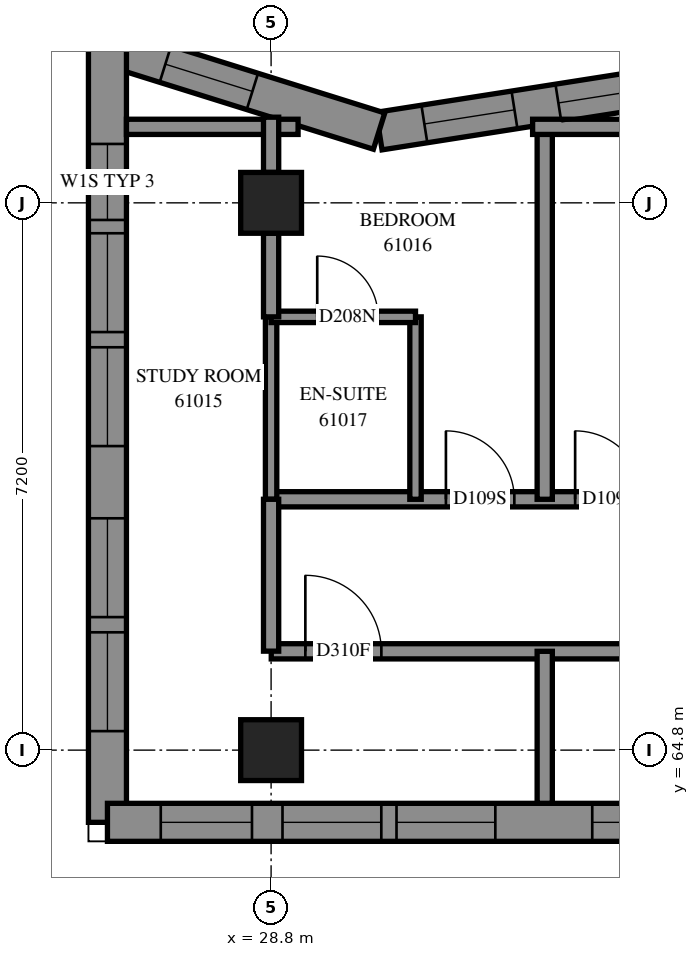
"""IFC4 building model, lengths in metres.
Left out: names, types, materials, properties, quantities, classifications, styles, units other than length and angle.
Written with IfcOpenShell. Run it as: python <this file> out.ifc"""

import sys

from ifc_helpers import new_model, si_unit, direction, frame, frame_2d, origin, origin_2d, place, context, subcontext, project, spatial, polyline, rectangle, outline, extrude, element, fill, save


model = new_model("IFC4")
c1 = context("Model", 3, precision=1e-05, world=origin(), true_north=direction((0.0, 1.0)))
c2 = subcontext(c1, "Body", "Model", "MODEL_VIEW")
j1 = project(units=[si_unit("LENGTHUNIT", "METRE"), si_unit("PLANEANGLEUNIT", "RADIAN")], contexts=[c1])
p1 = place(None, origin())
s1 = spatial("IfcSite", under=j1, at=p1, CompositionType="ELEMENT")
p2 = place(p1, origin())
s2 = spatial("IfcBuilding", under=s1, at=p2, CompositionType="ELEMENT")
p3 = place(p2, frame((0.0, 0.0, 223.6)))
s3 = spatial("IfcBuildingStorey", under=s2, at=p3, CompositionType="ELEMENT", Elevation=223.6)
for number, where, z_axis, x_axis in (
    (1, (28.8, 64.8, 0.0), (0.0, 0.0, 1.0), (1.0, 0.0, 0.0)),
    (2, (28.8, 72.0, 0.0), (0.0, 0.0, 1.0), (1.0, 0.0, 0.0)),
):
    element("IfcColumn", number, at=place(p3, frame(where, z_axis=z_axis, x_axis=x_axis)), inside=s3, PredefinedType="COLUMN", context=c2, shape_type="SweptSolid", body=[
        extrude(rectangle(XDim=0.8, YDim=0.8, at=origin_2d()), origin(), (0.0, 0.0, 1.0), 3.1),
    ])
p4 = place(p3, frame((34.083, 73.55, 0.0), z_axis=(0.0, 0.0, 1.0), x_axis=(-0.9879139197, -0.1550035072, 0.0)))
e3 = element("IfcWall", 3, at=p4, inside=s3, PredefinedType="SOLIDWALL", context=c2, shape_type="SweptSolid", body=[
    extrude(outline(polyline([(-0.039, -0.25), (3.85, -0.25), (3.967, 0.25), (0.039, 0.25), (-0.039, -0.25)])), origin(), (0.0, 0.0, 1.0), 3.1),
])
p5 = place(p4, frame((0.321, 0.0, 0.45)))
e4 = element("IfcOpeningElement", 4, at=p5, cuts=e3, PredefinedType="OPENING", context=c2, shape_type="SweptSolid", body=[
    extrude(rectangle(XDim=1.2, YDim=2.5, at=frame_2d((0.6, 1.25))), frame((0.0, 0.26, 0.0), z_axis=(0.0, -1.0, 0.0), x_axis=(1.0, 0.0, 0.0)), (0.0, 0.0, 1.0), 0.52),
])
p6 = place(p4, frame((2.106, 0.0, 0.45)))
e5 = element("IfcOpeningElement", 5, at=p6, cuts=e3, PredefinedType="OPENING", context=c2, shape_type="SweptSolid", body=[
    extrude(rectangle(XDim=1.2, YDim=2.5, at=frame_2d((0.6, 1.25))), frame((0.0, 0.26, 0.0), z_axis=(0.0, -1.0, 0.0), x_axis=(1.0, 0.0, 0.0)), (0.0, 0.0, 1.0), 0.52),
])
p7 = place(p3, frame((30.221, 72.944, 0.0), z_axis=(0.0, 0.0, 1.0), x_axis=(-0.9543287576, 0.2987584683, 0.0)))
e6 = element("IfcWall", 6, at=p7, inside=s3, PredefinedType="SOLIDWALL", context=c2, shape_type="SweptSolid", body=[
    extrude(outline(polyline([(0.058, -0.25), (4.085, -0.25), (3.405, 0.25), (-0.058, 0.25), (0.058, -0.25)])), origin(), (0.0, 0.0, 1.0), 3.1),
])
p8 = place(p7, frame((1.747, 0.0, 0.45)))
e7 = element("IfcOpeningElement", 7, at=p8, cuts=e6, PredefinedType="OPENING", context=c2, shape_type="SweptSolid", body=[
    extrude(rectangle(XDim=1.2, YDim=2.5, at=frame_2d((0.6, 1.25))), frame((0.0, 0.26, 0.0), z_axis=(0.0, -1.0, 0.0), x_axis=(1.0, 0.0, 0.0)), (0.0, 0.0, 1.0), 0.52),
])
p9 = place(p3, frame((26.647, 74.063, 0.0), z_axis=(0.0, 0.0, 1.0), x_axis=(0.0, -1.0, 0.0)))
e8 = element("IfcWall", 8, at=p9, inside=s3, PredefinedType="SOLIDWALL", context=c2, shape_type="SweptSolid", body=[
    extrude(outline(polyline([(-0.34, -0.25), (10.463, -0.25), (9.963, 0.25), (0.34, 0.25), (-0.34, -0.25)])), origin(), (0.0, 0.0, 1.0), 3.1),
])
p10 = place(p9, frame((2.463, 0.0, 0.45)))
e9 = element("IfcOpeningElement", 9, at=p10, cuts=e8, PredefinedType="OPENING", context=c2, shape_type="SweptSolid", body=[
    extrude(rectangle(XDim=1.3, YDim=2.5, at=frame_2d((0.65, 1.25))), frame((0.0, 0.26, 0.0), z_axis=(0.0, -1.0, 0.0), x_axis=(1.0, 0.0, 0.0)), (0.0, 0.0, 1.0), 0.52),
])
p11 = place(p9, frame((3.963, 0.0, 0.45)))
e10 = element("IfcOpeningElement", 10, at=p11, cuts=e8, PredefinedType="OPENING", context=c2, shape_type="SweptSolid", body=[
    extrude(rectangle(XDim=1.3, YDim=2.5, at=frame_2d((0.65, 1.25))), frame((0.0, 0.26, 0.0), z_axis=(0.0, -1.0, 0.0), x_axis=(1.0, 0.0, 0.0)), (0.0, 0.0, 1.0), 0.52),
])
p12 = place(p9, frame((6.213, 0.0, 0.45)))
e11 = element("IfcOpeningElement", 11, at=p12, cuts=e8, PredefinedType="OPENING", context=c2, shape_type="SweptSolid", body=[
    extrude(rectangle(XDim=1.3, YDim=2.5, at=frame_2d((0.65, 1.25))), frame((0.0, 0.26, 0.0), z_axis=(0.0, -1.0, 0.0), x_axis=(1.0, 0.0, 0.0)), (0.0, 0.0, 1.0), 0.52),
])
p13 = place(p9, frame((7.713, 0.0, 0.45)))
e12 = element("IfcOpeningElement", 12, at=p13, cuts=e8, PredefinedType="OPENING", context=c2, shape_type="SweptSolid", body=[
    extrude(rectangle(XDim=1.3, YDim=2.5, at=frame_2d((0.65, 1.25))), frame((0.0, 0.26, 0.0), z_axis=(0.0, -1.0, 0.0), x_axis=(1.0, 0.0, 0.0)), (0.0, 0.0, 1.0), 0.52),
])
p14 = place(p9, frame((1.288, 0.0, 0.45)))
e13 = element("IfcOpeningElement", 13, at=p14, cuts=e8, PredefinedType="OPENING", context=c2, shape_type="SweptSolid", body=[
    extrude(rectangle(XDim=1.0, YDim=2.5, at=frame_2d((0.5, 1.25))), frame((0.0, 0.26, 0.0), z_axis=(0.0, -1.0, 0.0), x_axis=(1.0, 0.0, 0.0)), (0.0, 0.0, 1.0), 0.52),
])
p15 = place(p3, frame((26.647, 63.85, 0.0), z_axis=(0.0, 0.0, 1.0), x_axis=(1.0, 0.0, 0.0)))
e14 = element("IfcWall", 14, at=p15, inside=s3, PredefinedType="SOLIDWALL", context=c2, shape_type="SweptSolid", body=[
    extrude(outline(polyline([(-0.25, -0.25), (8.153, -0.25), (8.653, 0.25), (0.25, 0.25), (-0.25, -0.25)])), origin(), (0.0, 0.0, 1.0), 3.1),
])
p16 = place(p15, frame((2.303, 0.0, 0.45)))
e15 = element("IfcOpeningElement", 15, at=p16, cuts=e14, PredefinedType="OPENING", context=c2, shape_type="SweptSolid", body=[
    extrude(rectangle(XDim=1.3, YDim=2.5, at=frame_2d((0.65, 1.25))), frame((0.0, 0.26, 0.0), z_axis=(0.0, -1.0, 0.0), x_axis=(1.0, 0.0, 0.0)), (0.0, 0.0, 1.0), 0.52),
])
p17 = place(p15, frame((3.803, 0.0, 0.45)))
e16 = element("IfcOpeningElement", 16, at=p17, cuts=e14, PredefinedType="OPENING", context=c2, shape_type="SweptSolid", body=[
    extrude(rectangle(XDim=1.3, YDim=2.5, at=frame_2d((0.65, 1.25))), frame((0.0, 0.26, 0.0), z_axis=(0.0, -1.0, 0.0), x_axis=(1.0, 0.0, 0.0)), (0.0, 0.0, 1.0), 0.52),
])
p18 = place(p15, frame((0.702, 0.0, 0.45)))
e17 = element("IfcOpeningElement", 17, at=p18, cuts=e14, PredefinedType="OPENING", context=c2, shape_type="SweptSolid", body=[
    extrude(rectangle(XDim=1.2, YDim=2.5, at=frame_2d((0.6, 1.25))), frame((0.0, 0.26, 0.0), z_axis=(0.0, -1.0, 0.0), x_axis=(1.0, 0.0, 0.0)), (0.0, 0.0, 1.0), 0.52),
])
p19 = place(p15, frame((6.378, 0.0, 0.45)))
e18 = element("IfcOpeningElement", 18, at=p19, cuts=e14, PredefinedType="OPENING", context=c2, shape_type="SweptSolid", body=[
    extrude(rectangle(XDim=1.2, YDim=2.5, at=frame_2d((0.6, 1.25))), frame((0.0, 0.26, 0.0), z_axis=(0.0, -1.0, 0.0), x_axis=(1.0, 0.0, 0.0)), (0.0, 0.0, 1.0), 0.52),
])
p20 = place(p3, frame((28.8, 68.1, 0.0), z_axis=(0.0, 0.0, 1.0), x_axis=(1.0, 0.0, 0.0)))
e19 = element("IfcWall", 19, at=p20, inside=s3, PredefinedType="PARTITIONING", context=c2, shape_type="SweptSolid", body=[
    extrude(rectangle(XDim=11.8, YDim=0.2, at=frame_2d((5.9, 0.0))), origin(), (0.0, 0.0, 1.0), 3.1),
])
p21 = place(p20, frame((2.3, 0.0, 0.0)))
e20 = element("IfcOpeningElement", 20, at=p21, cuts=e19, PredefinedType="OPENING", context=c2, shape_type="SweptSolid", body=[
    extrude(rectangle(XDim=0.9, YDim=2.1, at=frame_2d((0.45, 1.05))), frame((0.0, 0.11, 0.0), z_axis=(0.0, -1.0, 0.0), x_axis=(1.0, 0.0, 0.0)), (0.0, 0.0, 1.0), 0.22),
])
p22 = place(p20, frame((4.0, 0.0, 0.0)))
e21 = element("IfcOpeningElement", 21, at=p22, cuts=e19, PredefinedType="OPENING", context=c2, shape_type="SweptSolid", body=[
    extrude(rectangle(XDim=0.9, YDim=2.1, at=frame_2d((0.45, 1.05))), frame((0.0, 0.11, 0.0), z_axis=(0.0, -1.0, 0.0), x_axis=(1.0, 0.0, 0.0)), (0.0, 0.0, 1.0), 0.22),
])
p23 = place(p20, frame((9.5, 0.0, 0.0)))
e22 = element("IfcOpeningElement", 22, at=p23, cuts=e19, PredefinedType="OPENING", context=c2, shape_type="SweptSolid", body=[
    extrude(rectangle(XDim=0.9, YDim=2.1, at=frame_2d((0.45, 1.05))), frame((0.0, 0.11, 0.0), z_axis=(0.0, -1.0, 0.0), x_axis=(1.0, 0.0, 0.0)), (0.0, 0.0, 1.0), 0.22),
])
p24 = place(p3, frame((28.802, 66.1, 0.0), z_axis=(0.0, 0.0, 1.0), x_axis=(1.0, 0.0, 0.0)))
e23 = element("IfcWall", 23, at=p24, inside=s3, PredefinedType="PARTITIONING", context=c2, shape_type="SweptSolid", body=[
    extrude(rectangle(XDim=9.798, YDim=0.2, at=frame_2d((4.899, 0.0))), origin(), (0.0, 0.0, 1.0), 3.1),
])
p25 = place(p24, frame((0.449, 0.0, 0.0)))
e24 = element("IfcOpeningElement", 24, at=p25, cuts=e23, PredefinedType="OPENING", context=c2, shape_type="SweptSolid", body=[
    extrude(rectangle(XDim=1.0, YDim=2.1, at=frame_2d((0.5, 1.05))), frame((0.0, 0.11, 0.0), z_axis=(0.0, -1.0, 0.0), x_axis=(1.0, 0.0, 0.0)), (0.0, 0.0, 1.0), 0.22),
])
p26 = place(p24, frame((5.459, 0.0, 0.0)))
e25 = element("IfcOpeningElement", 25, at=p26, cuts=e23, PredefinedType="OPENING", context=c2, shape_type="SweptSolid", body=[
    extrude(rectangle(XDim=1.0, YDim=2.1, at=frame_2d((0.5, 1.05))), frame((0.0, 0.11, 0.0), z_axis=(0.0, -1.0, 0.0), x_axis=(1.0, 0.0, 0.0)), (0.0, 0.0, 1.0), 0.22),
])
p27 = place(p3, frame((32.4, 68.1, 0.0), z_axis=(0.0, 0.0, 1.0), x_axis=(0.0, 1.0, 0.0)))
e26 = element("IfcWall", 26, at=p27, inside=s3, PredefinedType="PARTITIONING", context=c2, shape_type="SweptSolid", body=[
    extrude(rectangle(XDim=4.933, YDim=0.2, at=frame_2d((2.466, 0.0))), origin(), (0.0, 0.0, 1.0), 3.1),
])
p28 = place(p3, frame((32.24, 73.0, 0.0), z_axis=(0.0, 0.0, 1.0), x_axis=(1.0, 0.0, 0.0)))
e27 = element("IfcWall", 27, at=p28, inside=s3, PredefinedType="PARTITIONING", context=c2, shape_type="SweptSolid", body=[
    extrude(rectangle(XDim=3.684, YDim=0.2, at=frame_2d((1.842, 0.0))), origin(), (0.0, 0.0, 1.0), 3.1),
])
p29 = place(p3, frame((28.8, 68.1, 0.0), z_axis=(0.0, 0.0, 1.0), x_axis=(0.0, 1.0, 0.0)))
e28 = element("IfcWall", 28, at=p29, inside=s3, PredefinedType="PARTITIONING", context=c2, shape_type="SweptSolid", body=[
    extrude(rectangle(XDim=2.4, YDim=0.15, at=frame_2d((1.2, 0.0))), origin(), (0.0, 0.0, 1.0), 2.6),
])
p30 = place(p3, frame((30.7, 68.1, 0.0), z_axis=(0.0, 0.0, 1.0), x_axis=(0.0, 1.0, 0.0)))
e29 = element("IfcWall", 29, at=p30, inside=s3, PredefinedType="PARTITIONING", context=c2, shape_type="SweptSolid", body=[
    extrude(rectangle(XDim=2.4, YDim=0.15, at=frame_2d((1.2, 0.0))), origin(), (0.0, 0.0, 1.0), 3.1),
])
p31 = place(p3, frame((26.897, 73.0, 0.0), z_axis=(0.0, 0.0, 1.0), x_axis=(1.0, 0.0, 0.0)))
e30 = element("IfcWall", 30, at=p31, inside=s3, PredefinedType="PARTITIONING", context=c2, shape_type="SweptSolid", body=[
    extrude(rectangle(XDim=2.258, YDim=0.2, at=frame_2d((1.129, 0.0))), origin(), (0.0, 0.0, 1.0), 3.1),
])
p32 = place(p3, frame((28.8, 66.102, 0.0), z_axis=(0.0, 0.0, 1.0), x_axis=(0.0, 1.0, 0.0)))
e31 = element("IfcWall", 31, at=p32, inside=s3, PredefinedType="PARTITIONING", context=c2, shape_type="SweptSolid", body=[
    extrude(rectangle(XDim=1.998, YDim=0.2, at=frame_2d((0.999, 0.0))), origin(), (0.0, 0.0, 1.0), 2.6),
])
p33 = place(p3, frame((32.4, 64.1, 0.0), z_axis=(0.0, 0.0, 1.0), x_axis=(0.0, 1.0, 0.0)))
e32 = element("IfcWall", 32, at=p33, inside=s3, PredefinedType="PARTITIONING", context=c2, shape_type="SweptSolid", body=[
    extrude(rectangle(XDim=2.0, YDim=0.2, at=frame_2d((1.0, 0.0))), origin(), (0.0, 0.0, 1.0), 3.1),
])
p34 = place(p3, frame((28.8, 70.5, 0.0), z_axis=(0.0, 0.0, 1.0), x_axis=(1.0, 0.0, 0.0)))
e33 = element("IfcWall", 33, at=p34, inside=s3, PredefinedType="PARTITIONING", context=c2, shape_type="SweptSolid", body=[
    extrude(rectangle(XDim=1.9, YDim=0.15, at=frame_2d((0.95, 0.0))), origin(), (0.0, 0.0, 1.0), 3.1),
])
p35 = place(p34, frame((0.607, 0.0, 0.0)))
e34 = element("IfcOpeningElement", 34, at=p35, cuts=e33, PredefinedType="OPENING", context=c2, shape_type="SweptSolid", body=[
    extrude(rectangle(XDim=0.8, YDim=2.1, at=frame_2d((0.4, 1.05))), frame((0.0, 0.085, 0.0), z_axis=(0.0, -1.0, 0.0), x_axis=(1.0, 0.0, 0.0)), (0.0, 0.0, 1.0), 0.17),
])
p36 = place(p3, frame((28.8, 70.5, 0.0), z_axis=(0.0, 0.0, 1.0), x_axis=(0.0, 1.0, 0.0)))
e35 = element("IfcWall", 35, at=p36, inside=s3, PredefinedType="PARTITIONING", context=c2, shape_type="SweptSolid", body=[
    extrude(rectangle(XDim=1.1, YDim=0.2, at=frame_2d((0.55, 0.0))), origin(), (0.0, 0.0, 1.0), 2.6),
])
p37 = place(p3, frame((28.8, 72.4, 0.0), z_axis=(0.0, 0.0, 1.0), x_axis=(0.0, 1.0, 0.0)))
e36 = element("IfcWall", 36, at=p37, inside=s3, PredefinedType="PARTITIONING", context=c2, shape_type="SweptSolid", body=[
    extrude(rectangle(XDim=0.727, YDim=0.2, at=frame_2d((0.363, 0.0))), origin(), (0.0, 0.0, 1.0), 3.1),
])
p38 = place(p5, origin())
e37 = element("IfcWindow", 37, at=p38, inside=s3, PartitioningType="SINGLE_PANEL", PredefinedType="WINDOW", context=c2, shape_type="SweptSolid", body=[
    extrude(rectangle(XDim=1.2, YDim=2.5, at=frame_2d((0.6, 1.25))), frame((0.0, 0.18, 0.0), z_axis=(0.0, -1.0, 0.0), x_axis=(1.0, 0.0, 0.0)), (0.0, 0.0, 1.0), 0.06),
])
fill(e4, e37)
p39 = place(p6, origin())
e38 = element("IfcWindow", 38, at=p39, inside=s3, PartitioningType="SINGLE_PANEL", PredefinedType="WINDOW", context=c2, shape_type="SweptSolid", body=[
    extrude(rectangle(XDim=1.2, YDim=2.5, at=frame_2d((0.6, 1.25))), frame((0.0, 0.18, 0.0), z_axis=(0.0, -1.0, 0.0), x_axis=(1.0, 0.0, 0.0)), (0.0, 0.0, 1.0), 0.06),
])
fill(e5, e38)
p40 = place(p8, origin())
e39 = element("IfcWindow", 39, at=p40, inside=s3, PartitioningType="SINGLE_PANEL", PredefinedType="WINDOW", context=c2, shape_type="SweptSolid", body=[
    extrude(rectangle(XDim=1.2, YDim=2.5, at=frame_2d((0.6, 1.25))), frame((0.0, 0.18, 0.0), z_axis=(0.0, -1.0, 0.0), x_axis=(1.0, 0.0, 0.0)), (0.0, 0.0, 1.0), 0.06),
])
fill(e7, e39)
p41 = place(p10, origin())
e40 = element("IfcWindow", 40, at=p41, inside=s3, PartitioningType="SINGLE_PANEL", PredefinedType="WINDOW", context=c2, shape_type="SweptSolid", body=[
    extrude(rectangle(XDim=1.3, YDim=2.5, at=frame_2d((0.65, 1.25))), frame((0.0, 0.18, 0.0), z_axis=(0.0, -1.0, 0.0), x_axis=(1.0, 0.0, 0.0)), (0.0, 0.0, 1.0), 0.06),
])
fill(e9, e40)
p42 = place(p11, origin())
e41 = element("IfcWindow", 41, at=p42, inside=s3, PartitioningType="SINGLE_PANEL", PredefinedType="WINDOW", context=c2, shape_type="SweptSolid", body=[
    extrude(rectangle(XDim=1.3, YDim=2.5, at=frame_2d((0.65, 1.25))), frame((0.0, 0.18, 0.0), z_axis=(0.0, -1.0, 0.0), x_axis=(1.0, 0.0, 0.0)), (0.0, 0.0, 1.0), 0.06),
])
fill(e10, e41)
p43 = place(p12, origin())
e42 = element("IfcWindow", 42, at=p43, inside=s3, PartitioningType="SINGLE_PANEL", PredefinedType="WINDOW", context=c2, shape_type="SweptSolid", body=[
    extrude(rectangle(XDim=1.3, YDim=2.5, at=frame_2d((0.65, 1.25))), frame((0.0, 0.18, 0.0), z_axis=(0.0, -1.0, 0.0), x_axis=(1.0, 0.0, 0.0)), (0.0, 0.0, 1.0), 0.06),
])
fill(e11, e42)
p44 = place(p13, origin())
e43 = element("IfcWindow", 43, at=p44, inside=s3, PartitioningType="SINGLE_PANEL", PredefinedType="WINDOW", context=c2, shape_type="SweptSolid", body=[
    extrude(rectangle(XDim=1.3, YDim=2.5, at=frame_2d((0.65, 1.25))), frame((0.0, 0.18, 0.0), z_axis=(0.0, -1.0, 0.0), x_axis=(1.0, 0.0, 0.0)), (0.0, 0.0, 1.0), 0.06),
])
fill(e12, e43)
p45 = place(p16, origin())
e44 = element("IfcWindow", 44, at=p45, inside=s3, PartitioningType="SINGLE_PANEL", PredefinedType="WINDOW", context=c2, shape_type="SweptSolid", body=[
    extrude(rectangle(XDim=1.3, YDim=2.5, at=frame_2d((0.65, 1.25))), frame((0.0, 0.18, 0.0), z_axis=(0.0, -1.0, 0.0), x_axis=(1.0, 0.0, 0.0)), (0.0, 0.0, 1.0), 0.06),
])
fill(e15, e44)
p46 = place(p17, origin())
e45 = element("IfcWindow", 45, at=p46, inside=s3, PartitioningType="SINGLE_PANEL", PredefinedType="WINDOW", context=c2, shape_type="SweptSolid", body=[
    extrude(rectangle(XDim=1.3, YDim=2.5, at=frame_2d((0.65, 1.25))), frame((0.0, 0.18, 0.0), z_axis=(0.0, -1.0, 0.0), x_axis=(1.0, 0.0, 0.0)), (0.0, 0.0, 1.0), 0.06),
])
fill(e16, e45)
p47 = place(p18, origin())
e46 = element("IfcWindow", 46, at=p47, inside=s3, PartitioningType="SINGLE_PANEL", PredefinedType="WINDOW", context=c2, shape_type="SweptSolid", body=[
    extrude(rectangle(XDim=1.2, YDim=2.5, at=frame_2d((0.6, 1.25))), frame((0.0, 0.18, 0.0), z_axis=(0.0, -1.0, 0.0), x_axis=(1.0, 0.0, 0.0)), (0.0, 0.0, 1.0), 0.06),
])
fill(e17, e46)
p48 = place(p19, origin())
e47 = element("IfcWindow", 47, at=p48, inside=s3, PartitioningType="SINGLE_PANEL", PredefinedType="WINDOW", context=c2, shape_type="SweptSolid", body=[
    extrude(rectangle(XDim=1.2, YDim=2.5, at=frame_2d((0.6, 1.25))), frame((0.0, 0.18, 0.0), z_axis=(0.0, -1.0, 0.0), x_axis=(1.0, 0.0, 0.0)), (0.0, 0.0, 1.0), 0.06),
])
fill(e18, e47)
p49 = place(p25, origin())
e48 = element("IfcDoor", 48, at=p49, inside=s3, OperationType="SINGLE_SWING_LEFT", PredefinedType="DOOR", context=c2, shape_type="SweptSolid", body=[
    extrude(rectangle(XDim=1.0, YDim=2.1, at=frame_2d((0.5, 1.05))), frame((0.0, 0.025, 0.0), z_axis=(0.0, -1.0, 0.0), x_axis=(1.0, 0.0, 0.0)), (0.0, 0.0, 1.0), 0.05),
])
fill(e24, e48)
p50 = place(p21, origin())
e49 = element("IfcDoor", 49, at=p50, inside=s3, OperationType="SINGLE_SWING_RIGHT", PredefinedType="DOOR", context=c2, shape_type="SweptSolid", body=[
    extrude(rectangle(XDim=0.9, YDim=2.1, at=frame_2d((0.45, 1.05))), frame((0.0, 0.025, 0.0), z_axis=(0.0, -1.0, 0.0), x_axis=(1.0, 0.0, 0.0)), (0.0, 0.0, 1.0), 0.05),
])
fill(e20, e49)
p51 = place(p35, origin())
e50 = element("IfcDoor", 50, at=p51, inside=s3, OperationType="SINGLE_SWING_RIGHT", PredefinedType="DOOR", context=c2, shape_type="SweptSolid", body=[
    extrude(rectangle(XDim=0.8, YDim=2.1, at=frame_2d((0.4, 1.05))), frame((0.0, 0.025, 0.0), z_axis=(0.0, -1.0, 0.0), x_axis=(1.0, 0.0, 0.0)), (0.0, 0.0, 1.0), 0.05),
])
fill(e34, e50)
p52 = place(p22, origin())
e51 = element("IfcDoor", 51, at=p52, inside=s3, OperationType="SINGLE_SWING_LEFT", PredefinedType="DOOR", context=c2, shape_type="SweptSolid", body=[
    extrude(rectangle(XDim=0.9, YDim=2.1, at=frame_2d((0.45, 1.05))), frame((0.0, 0.025, 0.0), z_axis=(0.0, -1.0, 0.0), x_axis=(1.0, 0.0, 0.0)), (0.0, 0.0, 1.0), 0.05),
])
fill(e21, e51)
p53 = place(p14, origin())
e52 = element("IfcWindow", 52, at=p53, inside=s3, PartitioningType="SINGLE_PANEL", PredefinedType="WINDOW", context=c2, shape_type="SweptSolid", body=[
    extrude(rectangle(XDim=1.0, YDim=2.5, at=frame_2d((0.5, 1.25))), frame((0.0, 0.18, 0.0), z_axis=(0.0, -1.0, 0.0), x_axis=(1.0, 0.0, 0.0)), (0.0, 0.0, 1.0), 0.06),
])
fill(e13, e52)
save(model, sys.argv[1])
